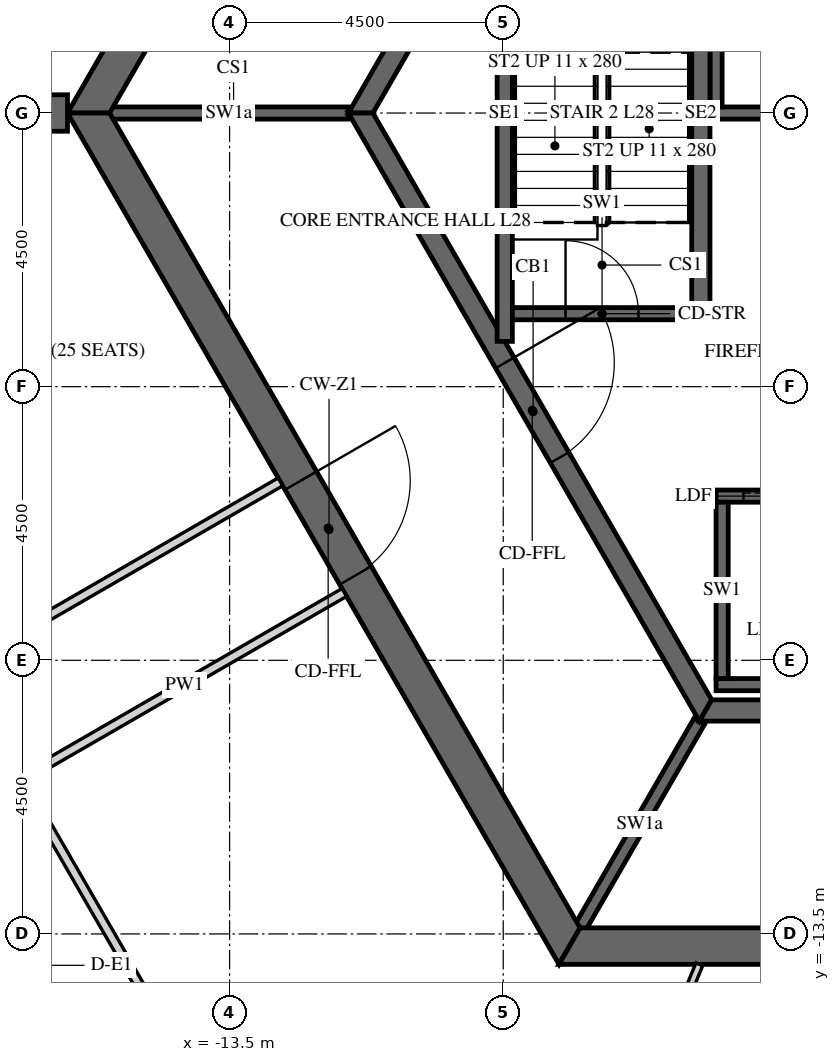
"""IFC4 building model, lengths in metres.
Left out: names, types, materials, properties, quantities, classifications, styles, units other than length and angle.
Written with IfcOpenShell. Run it as: python <this file> out.ifc"""

import sys

from ifc_helpers import new_model, si_unit, direction, frame, frame_2d, origin, place, context, subcontext, project, spatial, polyline, rectangle, outline, extrude, element, fill, save


model = new_model("IFC4")
c1 = context("Model", 3, precision=1e-05, world=origin(), true_north=direction((0.0, 1.0)))
c2 = subcontext(c1, "Body", "Model", "MODEL_VIEW")
j1 = project(units=[si_unit("LENGTHUNIT", "METRE"), si_unit("PLANEANGLEUNIT", "RADIAN")], contexts=[c1])
p1 = place(None, origin())
s1 = spatial("IfcSite", under=j1, at=p1, CompositionType="ELEMENT")
p2 = place(p1, origin())
s2 = spatial("IfcBuilding", under=s1, at=p2, CompositionType="ELEMENT")
p3 = place(p2, frame((0.0, 0.0, 123.3)))
s3 = spatial("IfcBuildingStorey", under=s2, at=p3, CompositionType="ELEMENT", Elevation=123.3)
p4 = place(p3, frame((-7.91, 13.7, -0.15), z_axis=(0.0, 0.0, 1.0), x_axis=(-0.499999880136, -0.866025472988, 0.0)))
e1 = element("IfcWall", 1, at=p4, inside=s3, PredefinedType="SHEAR", context=c2, shape_type="SweptSolid", body=[
    extrude(outline(polyline([(-0.173, -0.3), (15.993, -0.3), (15.646, 0.3), (0.173, 0.3), (-0.173, -0.3)])), origin(), (0.0, 0.0, 1.0), 3.9),
])
p5 = place(p4, frame((7.039, 0.0, 0.15)))
e2 = element("IfcOpeningElement", 2, at=p5, cuts=e1, PredefinedType="OPENING", context=c2, shape_type="SweptSolid", body=[
    extrude(rectangle(XDim=1.8, YDim=2.4, at=frame_2d((0.9, 1.2))), frame((0.0, 0.31, 0.0), z_axis=(0.0, -1.0, 0.0), x_axis=(1.0, 0.0, 0.0)), (0.0, 0.0, 1.0), 0.62),
])
p6 = place(p3, frame((-15.819, 0.0, -0.15), z_axis=(0.0, 0.0, 1.0), x_axis=(0.499999880136, -0.866025472988, 0.0)))
e3 = element("IfcWall", 3, at=p6, inside=s3, PredefinedType="SHEAR", context=c2, shape_type="SweptSolid", body=[
    extrude(outline(polyline([(-0.173, -0.3), (15.993, -0.3), (15.646, 0.3), (0.173, 0.3), (-0.173, -0.3)])), origin(), (0.0, 0.0, 1.0), 3.9),
])
p7 = place(p6, frame((6.981, 0.0, 0.15)))
e4 = element("IfcOpeningElement", 4, at=p7, cuts=e3, PredefinedType="OPENING", context=c2, shape_type="SweptSolid", body=[
    extrude(rectangle(XDim=1.8, YDim=2.4, at=frame_2d((0.9, 1.2))), frame((0.0, 0.31, 0.0), z_axis=(0.0, -1.0, 0.0), x_axis=(1.0, 0.0, 0.0)), (0.0, 0.0, 1.0), 0.62),
])
p8 = place(p3, frame((-7.91, -13.7, -0.15), z_axis=(0.0, 0.0, 1.0), x_axis=(1.0, 0.0, 0.0)))
e5 = element("IfcWall", 5, at=p8, inside=s3, PredefinedType="SHEAR", context=c2, shape_type="SweptSolid", body=[
    extrude(outline(polyline([(-0.173, -0.3), (15.993, -0.3), (15.646, 0.3), (0.173, 0.3), (-0.173, -0.3)])), origin(), (0.0, 0.0, 1.0), 3.9),
])
p9 = place(p8, frame((7.31, 0.0, 0.15)))
e6 = element("IfcOpeningElement", 6, at=p9, cuts=e5, PredefinedType="OPENING", context=c2, shape_type="SweptSolid", body=[
    extrude(rectangle(XDim=1.2, YDim=2.4, at=frame_2d((0.6, 1.2))), frame((0.0, 0.31, 0.0), z_axis=(0.0, -1.0, 0.0), x_axis=(1.0, 0.0, 0.0)), (0.0, 0.0, 1.0), 0.62),
])
p10 = place(p3, frame((-16.166, 0.0, -0.15), z_axis=(0.0, 0.0, 1.0), x_axis=(-1.0, 0.0, 0.0)))
e7 = element("IfcWall", 7, at=p10, inside=s3, PredefinedType="SHEAR", context=c2, shape_type="SweptSolid", body=[
    extrude(rectangle(XDim=16.509, YDim=0.6, at=frame_2d((8.254, 0.0))), origin(), (0.0, 0.0, 1.0), 3.9),
])
p11 = place(p10, frame((7.354, 0.0, 0.15)))
e8 = element("IfcOpeningElement", 8, at=p11, cuts=e7, PredefinedType="OPENING", context=c2, shape_type="SweptSolid", body=[
    extrude(rectangle(XDim=1.8, YDim=2.4, at=frame_2d((0.9, 1.2))), frame((0.0, 0.31, 0.0), z_axis=(0.0, -1.0, 0.0), x_axis=(1.0, 0.0, 0.0)), (0.0, 0.0, 1.0), 0.62),
])
p12 = place(p3, frame((-5.673, 9.825, -0.15), z_axis=(0.0, 0.0, 1.0), x_axis=(-0.499995046907, -0.866028263435, 0.0)))
e9 = element("IfcWall", 9, at=p12, inside=s3, PredefinedType="SHEAR", context=c2, shape_type="SweptSolid", body=[
    extrude(outline(polyline([(-0.101, -0.175), (11.446, -0.175), (11.244, 0.175), (0.101, 0.175), (-0.101, -0.175)])), origin(), (0.0, 0.0, 1.0), 3.9),
])
p13 = place(p12, frame((4.801, 0.0, 0.15)))
e10 = element("IfcOpeningElement", 10, at=p13, cuts=e9, PredefinedType="OPENING", context=c2, shape_type="SweptSolid", body=[
    extrude(rectangle(XDim=1.8, YDim=2.4, at=frame_2d((0.9, 1.2))), frame((0.0, 0.185, 0.0), z_axis=(0.0, -1.0, 0.0), x_axis=(1.0, 0.0, 0.0)), (0.0, 0.0, 1.0), 0.37),
])
p14 = place(p3, frame((-11.345, 0.0, -0.15), z_axis=(0.0, 0.0, 1.0), x_axis=(0.499995046907, -0.866028263435, 0.0)))
e11 = element("IfcWall", 11, at=p14, inside=s3, PredefinedType="SHEAR", context=c2, shape_type="SweptSolid", body=[
    extrude(outline(polyline([(-0.101, -0.175), (11.446, -0.175), (11.244, 0.175), (0.101, 0.175), (-0.101, -0.175)])), origin(), (0.0, 0.0, 1.0), 3.9),
])
p15 = place(p14, frame((4.744, 0.0, 0.15)))
e12 = element("IfcOpeningElement", 12, at=p15, cuts=e11, PredefinedType="OPENING", context=c2, shape_type="SweptSolid", body=[
    extrude(rectangle(XDim=1.8, YDim=2.4, at=frame_2d((0.9, 1.2))), frame((0.0, 0.185, 0.0), z_axis=(0.0, -1.0, 0.0), x_axis=(1.0, 0.0, 0.0)), (0.0, 0.0, 1.0), 0.37),
])
p16 = place(p3, frame((-5.673, -9.825, -0.15), z_axis=(0.0, 0.0, 1.0), x_axis=(1.0, 0.0, 0.0)))
e13 = element("IfcWall", 13, at=p16, inside=s3, PredefinedType="SHEAR", context=c2, shape_type="SweptSolid", body=[
    extrude(outline(polyline([(-0.101, -0.175), (11.446, -0.175), (11.244, 0.175), (0.101, 0.175), (-0.101, -0.175)])), origin(), (0.0, 0.0, 1.0), 3.9),
])
p17 = place(p3, frame((-5.6, 0.0, -0.25), z_axis=(0.0, 0.0, 1.0), x_axis=(1.0, 0.0, 0.0)))
e14 = element("IfcWall", 14, at=p17, inside=s3, PredefinedType="SHEAR", context=c2, shape_type="SweptSolid", body=[
    extrude(rectangle(XDim=11.2, YDim=0.2, at=frame_2d((5.6, 0.0))), origin(), (0.0, 0.0, 1.0), 3.9),
])
p18 = place(p3, frame((-5.5, 0.1, -0.25), z_axis=(0.0, 0.0, 1.0), x_axis=(0.0, 1.0, 0.0)))
e15 = element("IfcWall", 15, at=p18, inside=s3, PredefinedType="SHEAR", context=c2, shape_type="SweptSolid", body=[
    extrude(rectangle(XDim=3.1, YDim=0.2, at=frame_2d((1.55, 0.0))), origin(), (0.0, 0.0, 1.0), 3.9),
])
p19 = place(p3, frame((-5.5, -6.3, -0.25), z_axis=(0.0, 0.0, 1.0), x_axis=(1.0, 0.0, 0.0)))
e16 = element("IfcWall", 16, at=p19, inside=s3, PredefinedType="SHEAR", context=c2, shape_type="SweptSolid", body=[
    extrude(rectangle(XDim=9.2, YDim=0.2, at=frame_2d((4.6, 0.0))), origin(), (0.0, 0.0, 1.0), 3.9),
])
p20 = place(p19, frame((0.45, 0.0, 0.25)))
e17 = element("IfcOpeningElement", 17, at=p20, cuts=e16, PredefinedType="OPENING", context=c2, shape_type="SweptSolid", body=[
    extrude(rectangle(XDim=1.1, YDim=2.1, at=frame_2d((0.55, 1.05))), frame((0.0, 0.11, 0.0), z_axis=(0.0, -1.0, 0.0), x_axis=(1.0, 0.0, 0.0)), (0.0, 0.0, 1.0), 0.22),
])
p21 = place(p19, frame((2.25, 0.0, 0.25)))
e18 = element("IfcOpeningElement", 18, at=p21, cuts=e16, PredefinedType="OPENING", context=c2, shape_type="SweptSolid", body=[
    extrude(rectangle(XDim=1.1, YDim=2.1, at=frame_2d((0.55, 1.05))), frame((0.0, 0.11, 0.0), z_axis=(0.0, -1.0, 0.0), x_axis=(1.0, 0.0, 0.0)), (0.0, 0.0, 1.0), 0.22),
])
p22 = place(p19, frame((4.05, 0.0, 0.25)))
e19 = element("IfcOpeningElement", 19, at=p22, cuts=e16, PredefinedType="OPENING", context=c2, shape_type="SweptSolid", body=[
    extrude(rectangle(XDim=1.1, YDim=2.1, at=frame_2d((0.55, 1.05))), frame((0.0, 0.11, 0.0), z_axis=(0.0, -1.0, 0.0), x_axis=(1.0, 0.0, 0.0)), (0.0, 0.0, 1.0), 0.22),
])
p23 = place(p19, frame((5.85, 0.0, 0.25)))
e20 = element("IfcOpeningElement", 20, at=p23, cuts=e16, PredefinedType="OPENING", context=c2, shape_type="SweptSolid", body=[
    extrude(rectangle(XDim=1.1, YDim=2.1, at=frame_2d((0.55, 1.05))), frame((0.0, 0.11, 0.0), z_axis=(0.0, -1.0, 0.0), x_axis=(1.0, 0.0, 0.0)), (0.0, 0.0, 1.0), 0.22),
])
p24 = place(p19, frame((7.65, 0.0, 0.25)))
e21 = element("IfcOpeningElement", 21, at=p24, cuts=e16, PredefinedType="OPENING", context=c2, shape_type="SweptSolid", body=[
    extrude(rectangle(XDim=1.1, YDim=2.1, at=frame_2d((0.55, 1.05))), frame((0.0, 0.11, 0.0), z_axis=(0.0, -1.0, 0.0), x_axis=(1.0, 0.0, 0.0)), (0.0, 0.0, 1.0), 0.22),
])
p25 = place(p3, frame((-5.5, -9.4, -0.25), z_axis=(0.0, 0.0, 1.0), x_axis=(1.0, 0.0, 0.0)))
e22 = element("IfcWall", 22, at=p25, inside=s3, PredefinedType="SHEAR", context=c2, shape_type="SweptSolid", body=[
    extrude(rectangle(XDim=9.2, YDim=0.2, at=frame_2d((4.6, 0.0))), origin(), (0.0, 0.0, 1.0), 3.9),
])
p26 = place(p3, frame((-5.4, -9.3, -0.25), z_axis=(0.0, 0.0, 1.0), x_axis=(0.0, 1.0, 0.0)))
e23 = element("IfcWall", 23, at=p26, inside=s3, PredefinedType="SHEAR", context=c2, shape_type="SweptSolid", body=[
    extrude(rectangle(XDim=2.9, YDim=0.2, at=frame_2d((1.45, 0.0))), origin(), (0.0, 0.0, 1.0), 3.9),
])
p27 = place(p3, frame((-11.547, 0.0, -0.15), z_axis=(0.0, 0.0, 1.0), x_axis=(-1.0, 0.0, 0.0)))
e24 = element("IfcWall", 24, at=p27, inside=s3, PredefinedType="SHEAR", context=c2, shape_type="SweptSolid", body=[
    extrude(rectangle(XDim=3.926, YDim=0.2, at=frame_2d((1.963, 0.0))), origin(), (0.0, 0.0, 1.0), 3.9),
])
p28 = place(p3, frame((-5.773, -10.0, -0.15), z_axis=(0.0, 0.0, 1.0), x_axis=(-0.500038251005, -0.86600331843, 0.0)))
e25 = element("IfcWall", 25, at=p28, inside=s3, PredefinedType="SHEAR", context=c2, shape_type="SweptSolid", body=[
    extrude(rectangle(XDim=3.926, YDim=0.2, at=frame_2d((1.963, 0.0))), origin(), (0.0, 0.0, 1.0), 3.9),
])
p29 = place(p3, frame((-5.75, -3.4, -0.25), z_axis=(0.0, 0.0, 1.0), x_axis=(0.0, 1.0, 0.0)))
e26 = element("IfcWall", 26, at=p29, inside=s3, PredefinedType="SHEAR", context=c2, shape_type="SweptSolid", body=[
    extrude(rectangle(XDim=6.8, YDim=0.3, at=frame_2d((3.4, 0.0))), origin(), (0.0, 0.0, 1.0), 3.9),
])
p30 = place(p3, frame((-8.975, -3.755, -0.25), z_axis=(0.0, 0.0, 1.0), x_axis=(0.0, 1.0, 0.0)))
e27 = element("IfcWall", 27, at=p30, inside=s3, PredefinedType="SHEAR", context=c2, shape_type="SweptSolid", body=[
    extrude(rectangle(XDim=7.51, YDim=0.25, at=frame_2d((3.755, 0.0))), origin(), (0.0, 0.0, 1.0), 3.9),
])
p31 = place(p3, frame((-8.85, -3.3, -0.25), z_axis=(0.0, 0.0, 1.0), x_axis=(1.0, 0.0, 0.0)))
e28 = element("IfcWall", 28, at=p31, inside=s3, PredefinedType="SHEAR", context=c2, shape_type="SweptSolid", body=[
    extrude(rectangle(XDim=2.95, YDim=0.2, at=frame_2d((1.475, 0.0))), origin(), (0.0, 0.0, 1.0), 3.9),
])
p32 = place(p31, frame((0.875, 0.0, 0.25)))
e29 = element("IfcOpeningElement", 29, at=p32, cuts=e28, PredefinedType="OPENING", context=c2, shape_type="SweptSolid", body=[
    extrude(rectangle(XDim=1.2, YDim=2.4, at=frame_2d((0.6, 1.2))), frame((0.0, 0.11, 0.0), z_axis=(0.0, -1.0, 0.0), x_axis=(1.0, 0.0, 0.0)), (0.0, 0.0, 1.0), 0.22),
])
p33 = place(p3, frame((-24.09, -2.175, 0.0), z_axis=(0.0, 0.0, 1.0), x_axis=(0.499996832073, -0.86602723278, 0.0)))
e30 = element("IfcWall", 30, at=p33, inside=s3, PredefinedType="PARTITIONING", context=c2, shape_type="SweptSolid", body=[
    extrude(rectangle(XDim=23.877, YDim=0.15, at=frame_2d((11.938, 0.0))), origin(), (0.0, 0.0, 1.0), 2.988),
])
p34 = place(p33, frame((6.343, 0.0, 0.0)))
e31 = element("IfcOpeningElement", 31, at=p34, cuts=e30, PredefinedType="OPENING", context=c2, shape_type="SweptSolid", body=[
    extrude(rectangle(XDim=1.0, YDim=2.1, at=frame_2d((0.5, 1.05))), frame((0.0, 0.085, 0.0), z_axis=(0.0, -1.0, 0.0), x_axis=(1.0, 0.0, 0.0)), (0.0, 0.0, 1.0), 0.17),
])
p35 = place(p33, frame((13.172, 0.0, 0.0)))
e32 = element("IfcOpeningElement", 32, at=p35, cuts=e30, PredefinedType="OPENING", context=c2, shape_type="SweptSolid", body=[
    extrude(rectangle(XDim=1.0, YDim=2.1, at=frame_2d((0.5, 1.05))), frame((0.0, 0.085, 0.0), z_axis=(0.0, -1.0, 0.0), x_axis=(1.0, 0.0, 0.0)), (0.0, 0.0, 1.0), 0.17),
])
p36 = place(p33, frame((19.625, 0.0, 0.0)))
e33 = element("IfcOpeningElement", 33, at=p36, cuts=e30, PredefinedType="OPENING", context=c2, shape_type="SweptSolid", body=[
    extrude(rectangle(XDim=1.0, YDim=2.1, at=frame_2d((0.5, 1.05))), frame((0.0, 0.085, 0.0), z_axis=(0.0, -1.0, 0.0), x_axis=(1.0, 0.0, 0.0)), (0.0, 0.0, 1.0), 0.17),
])
p37 = place(p3, frame((-12.664, -6.066, 0.0), z_axis=(0.0, 0.0, 1.0), x_axis=(-0.866023618125, -0.500003092839, 0.0)))
e34 = element("IfcWall", 34, at=p37, inside=s3, PredefinedType="PARTITIONING", context=c2, shape_type="SweptSolid", body=[
    extrude(rectangle(XDim=6.15, YDim=0.15, at=frame_2d((3.075, 0.0))), origin(), (0.0, 0.0, 1.0), 2.988),
])
p38 = place(p3, frame((-11.197, -20.907, 0.0), z_axis=(0.0, 0.0, 1.0), x_axis=(-0.500004557924, 0.86602277225, 0.0)))
e35 = element("IfcWall", 35, at=p38, inside=s3, PredefinedType="PARTITIONING", context=c2, shape_type="SweptSolid", body=[
    extrude(rectangle(XDim=11.487, YDim=0.15, at=frame_2d((5.743, 0.0))), origin(), (0.0, 0.0, 1.0), 2.988),
])
p39 = place(p38, frame((5.293, 0.0, 0.0)))
e36 = element("IfcOpeningElement", 36, at=p39, cuts=e35, PredefinedType="OPENING", context=c2, shape_type="SweptSolid", body=[
    extrude(rectangle(XDim=0.9, YDim=2.1, at=frame_2d((0.45, 1.05))), frame((0.0, 0.085, 0.0), z_axis=(0.0, -1.0, 0.0), x_axis=(1.0, 0.0, 0.0)), (0.0, 0.0, 1.0), 0.17),
])
p40 = place(p3, frame((-16.875, -10.922, 0.0), z_axis=(0.0, 0.0, 1.0), x_axis=(0.866023634079, 0.500003065207, 0.0)))
e37 = element("IfcWall", 37, at=p40, inside=s3, PredefinedType="PARTITIONING", context=c2, shape_type="SweptSolid", body=[
    extrude(rectangle(XDim=6.075, YDim=0.15, at=frame_2d((3.038, 0.0))), origin(), (0.0, 0.0, 1.0), 2.988),
])
p41 = place(p3, frame((-5.775, -14.0, 0.0), z_axis=(0.0, 0.0, 1.0), x_axis=(-0.381361051417, -0.924426172532, 0.0)))
e38 = element("IfcWall", 38, at=p41, inside=s3, PredefinedType="PARTITIONING", context=c2, shape_type="SweptSolid", body=[
    extrude(rectangle(XDim=7.271, YDim=0.12, at=frame_2d((3.636, 0.0))), origin(), (0.0, 0.0, 1.0), 2.988),
])
p42 = place(p7, origin())
e39 = element("IfcDoor", 39, at=p42, inside=s3, OperationType="DOUBLE_DOOR_SINGLE_SWING", PredefinedType="DOOR", context=c2, shape_type="SweptSolid", body=[
    extrude(rectangle(XDim=1.8, YDim=2.4, at=frame_2d((0.9, 1.2))), frame((0.0, 0.025, 0.0), z_axis=(0.0, -1.0, 0.0), x_axis=(1.0, 0.0, 0.0)), (0.0, 0.0, 1.0), 0.05),
])
fill(e4, e39)
p43 = place(p15, origin())
e40 = element("IfcDoor", 40, at=p43, inside=s3, OperationType="DOUBLE_DOOR_SINGLE_SWING", PredefinedType="DOOR", context=c2, shape_type="SweptSolid", body=[
    extrude(rectangle(XDim=1.8, YDim=2.4, at=frame_2d((0.9, 1.2))), frame((0.0, 0.025, 0.0), z_axis=(0.0, -1.0, 0.0), x_axis=(1.0, 0.0, 0.0)), (0.0, 0.0, 1.0), 0.05),
])
fill(e12, e40)
p44 = place(p32, origin())
e41 = element("IfcDoor", 41, at=p44, inside=s3, OperationType="SINGLE_SWING_LEFT", PredefinedType="DOOR", context=c2, shape_type="SweptSolid", body=[
    extrude(rectangle(XDim=1.2, YDim=2.4, at=frame_2d((0.6, 1.2))), frame((0.0, 0.025, 0.0), z_axis=(0.0, -1.0, 0.0), x_axis=(1.0, 0.0, 0.0)), (0.0, 0.0, 1.0), 0.05),
])
fill(e29, e41)
p45 = place(p20, origin())
e42 = element("IfcDoor", 42, at=p45, inside=s3, OperationType="SLIDING_TO_LEFT", PredefinedType="DOOR", context=c2, shape_type="SweptSolid", body=[
    extrude(rectangle(XDim=1.1, YDim=2.1, at=frame_2d((0.55, 1.05))), frame((0.0, 0.025, 0.0), z_axis=(0.0, -1.0, 0.0), x_axis=(1.0, 0.0, 0.0)), (0.0, 0.0, 1.0), 0.05),
])
fill(e17, e42)
save(model, sys.argv[1])
